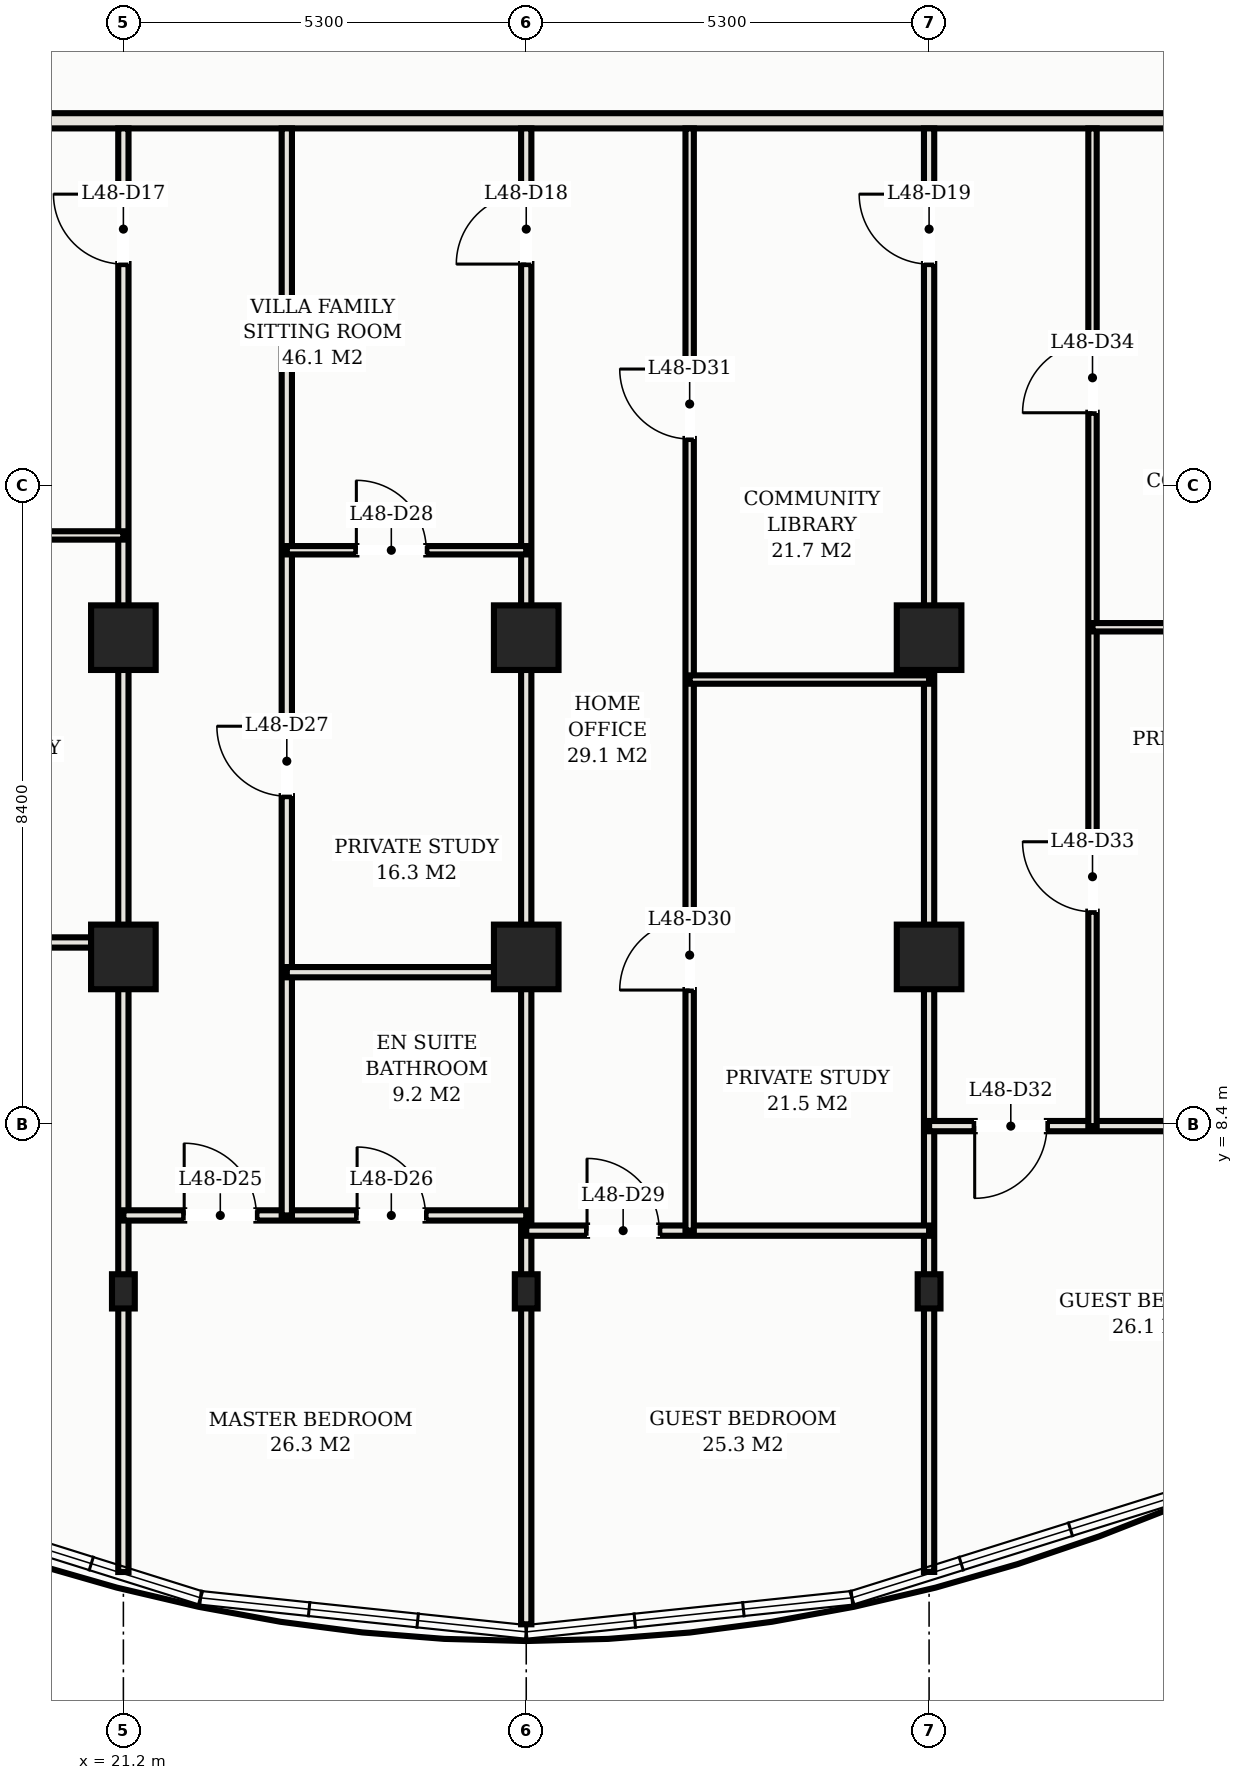
"""IFC4 building model, lengths in metres.
Left out: names, types, materials, properties, quantities, classifications, styles, units other than length and angle.
Written with IfcOpenShell. Run it as: python <this file> out.ifc"""

import sys

from ifc_helpers import new_model, si_unit, direction, frame, frame_2d, origin, origin_2d, place, context, subcontext, project, spatial, rectangle, hollow_rectangle, extrude, element, fill, save


model = new_model("IFC4")
c1 = context("Model", 3, precision=1e-05, world=origin(), true_north=direction((0.0, 1.0)))
c2 = subcontext(c1, "Body", "Model", "MODEL_VIEW")
j1 = project(units=[si_unit("LENGTHUNIT", "METRE"), si_unit("PLANEANGLEUNIT", "RADIAN")], contexts=[c1])
p1 = place(None, origin())
s1 = spatial("IfcSite", under=j1, at=p1, CompositionType="ELEMENT")
p2 = place(p1, origin())
s2 = spatial("IfcBuilding", under=s1, at=p2, CompositionType="ELEMENT")
p3 = place(p2, frame((0.0, 0.0, 175.5)))
s3 = spatial("IfcBuildingStorey", under=s2, at=p3, CompositionType="ELEMENT", Elevation=175.5)
for number, where, z_axis, x_axis in (
    (1, (21.2, 14.8, 0.0), (0.0, 0.0, 1.0), (1.0, 0.0, 0.0)),
    (2, (21.2, 10.6, 0.0), (0.0, 0.0, 1.0), (1.0, 0.0, 0.0)),
    (3, (26.5, 14.8, 0.0), (0.0, 0.0, 1.0), (1.0, 0.0, 0.0)),
    (4, (26.5, 10.6, 0.0), (0.0, 0.0, 1.0), (1.0, 0.0, 0.0)),
    (5, (31.8, 14.8, 0.0), (0.0, 0.0, 1.0), (1.0, 0.0, 0.0)),
    (6, (31.8, 10.6, 0.0), (0.0, 0.0, 1.0), (1.0, 0.0, 0.0)),
):
    element("IfcColumn", number, at=place(p3, frame(where, z_axis=z_axis, x_axis=x_axis)), inside=s3, PredefinedType="COLUMN", context=c2, shape_type="SweptSolid", body=[
        extrude(hollow_rectangle(XDim=0.85, YDim=0.85, WallThickness=0.028, at=origin_2d()), origin(), (0.0, 0.0, 1.0), 3.3),
    ])
for number, where, z_axis, x_axis in (
    (7, (21.2, 6.2, 0.0), (0.0, 0.0, 1.0), (1.0, 0.0, 0.0)),
    (8, (26.5, 6.2, 0.0), (0.0, 0.0, 1.0), (1.0, 0.0, 0.0)),
    (9, (31.8, 6.2, 0.0), (0.0, 0.0, 1.0), (1.0, 0.0, 0.0)),
):
    element("IfcColumn", number, at=place(p3, frame(where, z_axis=z_axis, x_axis=x_axis)), inside=s3, PredefinedType="COLUMN", context=c2, shape_type="SweptSolid", body=[
        extrude(hollow_rectangle(XDim=0.3, YDim=0.45, WallThickness=0.016, at=origin_2d()), origin(), (0.0, 0.0, 1.0), 3.3),
    ])
p4 = place(p3, frame((4.32, 21.6, 0.0), z_axis=(0.0, 0.0, 1.0), x_axis=(1.0, 0.0, 0.0)))
e10 = element("IfcWall", 10, at=p4, inside=s3, PredefinedType="PARTITIONING", context=c2, shape_type="SweptSolid", body=[
    extrude(rectangle(XDim=44.36, YDim=0.2, at=frame_2d((22.18, 0.0))), origin(), (0.0, 0.0, 1.0), 2.38),
])
p5 = place(p4, frame((7.03, 0.0, 0.0)))
e11 = element("IfcOpeningElement", 11, at=p5, cuts=e10, PredefinedType="OPENING", context=c2, shape_type="SweptSolid", body=[
    extrude(rectangle(XDim=1.1, YDim=2.25, at=frame_2d((0.55, 1.125))), frame((0.0, 0.11, 0.0), z_axis=(0.0, -1.0, 0.0), x_axis=(1.0, 0.0, 0.0)), (0.0, 0.0, 1.0), 0.22),
])
p6 = place(p4, frame((2.635, 0.0, 0.0)))
e12 = element("IfcOpeningElement", 12, at=p6, cuts=e10, PredefinedType="OPENING", context=c2, shape_type="SweptSolid", body=[
    extrude(rectangle(XDim=0.92, YDim=2.15, at=frame_2d((0.46, 1.075))), frame((0.0, 0.11, 0.0), z_axis=(0.0, -1.0, 0.0), x_axis=(1.0, 0.0, 0.0)), (0.0, 0.0, 1.0), 0.22),
])
p7 = place(p4, frame((40.805, 0.0, 0.0)))
e13 = element("IfcOpeningElement", 13, at=p7, cuts=e10, PredefinedType="OPENING", context=c2, shape_type="SweptSolid", body=[
    extrude(rectangle(XDim=0.92, YDim=2.15, at=frame_2d((0.46, 1.075))), frame((0.0, 0.11, 0.0), z_axis=(0.0, -1.0, 0.0), x_axis=(1.0, 0.0, 0.0)), (0.0, 0.0, 1.0), 0.22),
])
p8 = place(p3, frame((21.2, 2.508, 0.0), z_axis=(0.0, 0.0, 1.0), x_axis=(0.0, 1.0, 0.0)))
e14 = element("IfcWall", 14, at=p8, inside=s3, PredefinedType="PARTITIONING", context=c2, shape_type="SweptSolid", body=[
    extrude(rectangle(XDim=18.992, YDim=0.135, at=frame_2d((9.496, 0.0))), origin(), (0.0, 0.0, 1.0), 2.38),
])
p9 = place(p8, frame((17.207, 0.0, 0.0)))
e15 = element("IfcOpeningElement", 15, at=p9, cuts=e14, PredefinedType="OPENING", context=c2, shape_type="SweptSolid", body=[
    extrude(rectangle(XDim=0.92, YDim=2.15, at=frame_2d((0.46, 1.075))), frame((0.0, 0.078, 0.0), z_axis=(0.0, -1.0, 0.0), x_axis=(1.0, 0.0, 0.0)), (0.0, 0.0, 1.0), 0.155),
])
p10 = place(p3, frame((26.5, 1.82, 0.0), z_axis=(0.0, 0.0, 1.0), x_axis=(0.0, 1.0, 0.0)))
e16 = element("IfcWall", 16, at=p10, inside=s3, PredefinedType="PARTITIONING", context=c2, shape_type="SweptSolid", body=[
    extrude(rectangle(XDim=19.68, YDim=0.135, at=frame_2d((9.84, 0.0))), origin(), (0.0, 0.0, 1.0), 2.38),
])
p11 = place(p10, frame((17.895, 0.0, 0.0)))
e17 = element("IfcOpeningElement", 17, at=p11, cuts=e16, PredefinedType="OPENING", context=c2, shape_type="SweptSolid", body=[
    extrude(rectangle(XDim=0.92, YDim=2.15, at=frame_2d((0.46, 1.075))), frame((0.0, 0.078, 0.0), z_axis=(0.0, -1.0, 0.0), x_axis=(1.0, 0.0, 0.0)), (0.0, 0.0, 1.0), 0.155),
])
p12 = place(p3, frame((31.8, 2.509, 0.0), z_axis=(0.0, 0.0, 1.0), x_axis=(0.0, 1.0, 0.0)))
e18 = element("IfcWall", 18, at=p12, inside=s3, PredefinedType="PARTITIONING", context=c2, shape_type="SweptSolid", body=[
    extrude(rectangle(XDim=18.991, YDim=0.135, at=frame_2d((9.496, 0.0))), origin(), (0.0, 0.0, 1.0), 2.38),
])
p13 = place(p12, frame((17.206, 0.0, 0.0)))
e19 = element("IfcOpeningElement", 19, at=p13, cuts=e18, PredefinedType="OPENING", context=c2, shape_type="SweptSolid", body=[
    extrude(rectangle(XDim=0.92, YDim=2.15, at=frame_2d((0.46, 1.075))), frame((0.0, 0.078, 0.0), z_axis=(0.0, -1.0, 0.0), x_axis=(1.0, 0.0, 0.0)), (0.0, 0.0, 1.0), 0.155),
])
p14 = place(p3, frame((10.6, 10.79, 0.0), z_axis=(0.0, 0.0, 1.0), x_axis=(1.0, 0.0, 0.0)))
e20 = element("IfcWall", 20, at=p14, inside=s3, PredefinedType="PARTITIONING", context=c2, shape_type="SweptSolid", body=[
    extrude(rectangle(XDim=10.6, YDim=0.135, at=frame_2d((5.3, 0.0))), origin(), (0.0, 0.0, 1.0), 2.38),
])
p15 = place(p14, frame((0.425, 0.0, 0.0)))
e21 = element("IfcOpeningElement", 21, at=p15, cuts=e20, PredefinedType="OPENING", context=c2, shape_type="SweptSolid", body=[
    extrude(rectangle(XDim=1.5, YDim=2.25, at=frame_2d((0.75, 1.125))), frame((0.0, 0.078, 0.0), z_axis=(0.0, -1.0, 0.0), x_axis=(1.0, 0.0, 0.0)), (0.0, 0.0, 1.0), 0.155),
])
p16 = place(p3, frame((15.9, 16.145, 0.0), z_axis=(0.0, 0.0, 1.0), x_axis=(1.0, 0.0, 0.0)))
e22 = element("IfcWall", 22, at=p16, inside=s3, PredefinedType="MOVABLE", context=c2, shape_type="SweptSolid", body=[
    extrude(rectangle(XDim=5.3, YDim=0.11, at=frame_2d((2.65, 0.0))), origin(), (0.0, 0.0, 1.0), 2.38),
])
p17 = place(p16, frame((1.84, 0.0, 0.0)))
e23 = element("IfcOpeningElement", 23, at=p17, cuts=e22, PredefinedType="OPENING", context=c2, shape_type="SweptSolid", body=[
    extrude(rectangle(XDim=0.92, YDim=2.15, at=frame_2d((0.46, 1.075))), frame((0.0, 0.065, 0.0), z_axis=(0.0, -1.0, 0.0), x_axis=(1.0, 0.0, 0.0)), (0.0, 0.0, 1.0), 0.13),
])
p18 = place(p3, frame((21.2, 7.199, 0.0), z_axis=(0.0, 0.0, 1.0), x_axis=(1.0, 0.0, 0.0)))
e24 = element("IfcWall", 24, at=p18, inside=s3, PredefinedType="PARTITIONING", context=c2, shape_type="SweptSolid", body=[
    extrude(rectangle(XDim=5.3, YDim=0.135, at=frame_2d((2.65, 0.0))), origin(), (0.0, 0.0, 1.0), 2.38),
])
p19 = place(p18, frame((0.8, 0.0, 0.0)))
e25 = element("IfcOpeningElement", 25, at=p19, cuts=e24, PredefinedType="OPENING", context=c2, shape_type="SweptSolid", body=[
    extrude(rectangle(XDim=0.95, YDim=2.15, at=frame_2d((0.475, 1.075))), frame((0.0, 0.078, 0.0), z_axis=(0.0, -1.0, 0.0), x_axis=(1.0, 0.0, 0.0)), (0.0, 0.0, 1.0), 0.155),
])
p20 = place(p18, frame((3.075, 0.0, 0.0)))
e26 = element("IfcOpeningElement", 26, at=p20, cuts=e24, PredefinedType="OPENING", context=c2, shape_type="SweptSolid", body=[
    extrude(rectangle(XDim=0.9, YDim=2.15, at=frame_2d((0.45, 1.075))), frame((0.0, 0.078, 0.0), z_axis=(0.0, -1.0, 0.0), x_axis=(1.0, 0.0, 0.0)), (0.0, 0.0, 1.0), 0.155),
])
p21 = place(p3, frame((23.35, 7.199, 0.0), z_axis=(0.0, 0.0, 1.0), x_axis=(0.0, 1.0, 0.0)))
e27 = element("IfcWall", 27, at=p21, inside=s3, PredefinedType="PARTITIONING", context=c2, shape_type="SweptSolid", body=[
    extrude(rectangle(XDim=14.301, YDim=0.135, at=frame_2d((7.15, 0.0))), origin(), (0.0, 0.0, 1.0), 2.38),
])
p22 = place(p21, frame((5.516, 0.0, 0.0)))
e28 = element("IfcOpeningElement", 28, at=p22, cuts=e27, PredefinedType="OPENING", context=c2, shape_type="SweptSolid", body=[
    extrude(rectangle(XDim=0.92, YDim=2.15, at=frame_2d((0.46, 1.075))), frame((0.0, 0.078, 0.0), z_axis=(0.0, -1.0, 0.0), x_axis=(1.0, 0.0, 0.0)), (0.0, 0.0, 1.0), 0.155),
])
p23 = place(p3, frame((23.35, 10.399, 0.0), z_axis=(0.0, 0.0, 1.0), x_axis=(1.0, 0.0, 0.0)))
e29 = element("IfcWall", 29, at=p23, inside=s3, PredefinedType="PARTITIONING", context=c2, shape_type="SweptSolid", body=[
    extrude(rectangle(XDim=3.15, YDim=0.135, at=frame_2d((1.575, 0.0))), origin(), (0.0, 0.0, 1.0), 2.38),
])
p24 = place(p3, frame((23.35, 15.95, 0.0), z_axis=(0.0, 0.0, 1.0), x_axis=(1.0, 0.0, 0.0)))
e30 = element("IfcWall", 30, at=p24, inside=s3, PredefinedType="MOVABLE", context=c2, shape_type="SweptSolid", body=[
    extrude(rectangle(XDim=3.15, YDim=0.11, at=frame_2d((1.575, 0.0))), origin(), (0.0, 0.0, 1.0), 2.38),
])
p25 = place(p24, frame((0.915, 0.0, 0.0)))
e31 = element("IfcOpeningElement", 31, at=p25, cuts=e30, PredefinedType="OPENING", context=c2, shape_type="SweptSolid", body=[
    extrude(rectangle(XDim=0.92, YDim=2.15, at=frame_2d((0.46, 1.075))), frame((0.0, 0.065, 0.0), z_axis=(0.0, -1.0, 0.0), x_axis=(1.0, 0.0, 0.0)), (0.0, 0.0, 1.0), 0.13),
])
p26 = place(p3, frame((26.5, 6.999, 0.0), z_axis=(0.0, 0.0, 1.0), x_axis=(1.0, 0.0, 0.0)))
e32 = element("IfcWall", 32, at=p26, inside=s3, PredefinedType="PARTITIONING", context=c2, shape_type="SweptSolid", body=[
    extrude(rectangle(XDim=5.3, YDim=0.135, at=frame_2d((2.65, 0.0))), origin(), (0.0, 0.0, 1.0), 2.38),
])
p27 = place(p26, frame((0.8, 0.0, 0.0)))
e33 = element("IfcOpeningElement", 33, at=p27, cuts=e32, PredefinedType="OPENING", context=c2, shape_type="SweptSolid", body=[
    extrude(rectangle(XDim=0.95, YDim=2.15, at=frame_2d((0.475, 1.075))), frame((0.0, 0.078, 0.0), z_axis=(0.0, -1.0, 0.0), x_axis=(1.0, 0.0, 0.0)), (0.0, 0.0, 1.0), 0.155),
])
p28 = place(p3, frame((28.65, 6.999, 0.0), z_axis=(0.0, 0.0, 1.0), x_axis=(0.0, 1.0, 0.0)))
e34 = element("IfcWall", 34, at=p28, inside=s3, PredefinedType="MOVABLE", context=c2, shape_type="SweptSolid", body=[
    extrude(rectangle(XDim=14.501, YDim=0.11, at=frame_2d((7.25, 0.0))), origin(), (0.0, 0.0, 1.0), 2.38),
])
p29 = place(p28, frame((3.165, 0.0, 0.0)))
e35 = element("IfcOpeningElement", 35, at=p29, cuts=e34, PredefinedType="OPENING", context=c2, shape_type="SweptSolid", body=[
    extrude(rectangle(XDim=0.92, YDim=2.15, at=frame_2d((0.46, 1.075))), frame((0.0, 0.065, 0.0), z_axis=(0.0, -1.0, 0.0), x_axis=(1.0, 0.0, 0.0)), (0.0, 0.0, 1.0), 0.13),
])
p30 = place(p28, frame((10.415, 0.0, 0.0)))
e36 = element("IfcOpeningElement", 36, at=p30, cuts=e34, PredefinedType="OPENING", context=c2, shape_type="SweptSolid", body=[
    extrude(rectangle(XDim=0.92, YDim=2.15, at=frame_2d((0.46, 1.075))), frame((0.0, 0.065, 0.0), z_axis=(0.0, -1.0, 0.0), x_axis=(1.0, 0.0, 0.0)), (0.0, 0.0, 1.0), 0.13),
])
p31 = place(p3, frame((28.65, 14.249, 0.0), z_axis=(0.0, 0.0, 1.0), x_axis=(1.0, 0.0, 0.0)))
e37 = element("IfcWall", 37, at=p31, inside=s3, PredefinedType="MOVABLE", context=c2, shape_type="SweptSolid", body=[
    extrude(rectangle(XDim=3.15, YDim=0.11, at=frame_2d((1.575, 0.0))), origin(), (0.0, 0.0, 1.0), 2.38),
])
p32 = place(p3, frame((31.8, 8.374, 0.0), z_axis=(0.0, 0.0, 1.0), x_axis=(1.0, 0.0, 0.0)))
e38 = element("IfcWall", 38, at=p32, inside=s3, PredefinedType="PARTITIONING", context=c2, shape_type="SweptSolid", body=[
    extrude(rectangle(XDim=5.3, YDim=0.135, at=frame_2d((2.65, 0.0))), origin(), (0.0, 0.0, 1.0), 2.38),
])
p33 = place(p32, frame((0.6, 0.0, 0.0)))
e39 = element("IfcOpeningElement", 39, at=p33, cuts=e38, PredefinedType="OPENING", context=c2, shape_type="SweptSolid", body=[
    extrude(rectangle(XDim=0.95, YDim=2.15, at=frame_2d((0.475, 1.075))), frame((0.0, 0.078, 0.0), z_axis=(0.0, -1.0, 0.0), x_axis=(1.0, 0.0, 0.0)), (0.0, 0.0, 1.0), 0.155),
])
p34 = place(p3, frame((33.95, 8.374, 0.0), z_axis=(0.0, 0.0, 1.0), x_axis=(0.0, 1.0, 0.0)))
e40 = element("IfcWall", 40, at=p34, inside=s3, PredefinedType="MOVABLE", context=c2, shape_type="SweptSolid", body=[
    extrude(rectangle(XDim=13.126, YDim=0.11, at=frame_2d((6.563, 0.0))), origin(), (0.0, 0.0, 1.0), 2.38),
])
p35 = place(p34, frame((2.821, 0.0, 0.0)))
e41 = element("IfcOpeningElement", 41, at=p35, cuts=e40, PredefinedType="OPENING", context=c2, shape_type="SweptSolid", body=[
    extrude(rectangle(XDim=0.92, YDim=2.15, at=frame_2d((0.46, 1.075))), frame((0.0, 0.065, 0.0), z_axis=(0.0, -1.0, 0.0), x_axis=(1.0, 0.0, 0.0)), (0.0, 0.0, 1.0), 0.13),
])
p36 = place(p34, frame((9.385, 0.0, 0.0)))
e42 = element("IfcOpeningElement", 42, at=p36, cuts=e40, PredefinedType="OPENING", context=c2, shape_type="SweptSolid", body=[
    extrude(rectangle(XDim=0.92, YDim=2.15, at=frame_2d((0.46, 1.075))), frame((0.0, 0.065, 0.0), z_axis=(0.0, -1.0, 0.0), x_axis=(1.0, 0.0, 0.0)), (0.0, 0.0, 1.0), 0.13),
])
p37 = place(p3, frame((33.95, 14.937, 0.0), z_axis=(0.0, 0.0, 1.0), x_axis=(1.0, 0.0, 0.0)))
e43 = element("IfcWall", 43, at=p37, inside=s3, PredefinedType="MOVABLE", context=c2, shape_type="SweptSolid", body=[
    extrude(rectangle(XDim=3.15, YDim=0.11, at=frame_2d((1.575, 0.0))), origin(), (0.0, 0.0, 1.0), 2.38),
])
p38 = place(p9, origin())
e44 = element("IfcDoor", 44, at=p38, inside=s3, OperationType="SINGLE_SWING_RIGHT", PredefinedType="DOOR", context=c2, shape_type="SweptSolid", body=[
    extrude(rectangle(XDim=0.92, YDim=2.15, at=frame_2d((0.46, 1.075))), frame((0.0, 0.025, 0.0), z_axis=(0.0, -1.0, 0.0), x_axis=(1.0, 0.0, 0.0)), (0.0, 0.0, 1.0), 0.05),
])
fill(e15, e44)
p39 = place(p11, origin())
e45 = element("IfcDoor", 45, at=p39, inside=s3, OperationType="SINGLE_SWING_LEFT", PredefinedType="DOOR", context=c2, shape_type="SweptSolid", body=[
    extrude(rectangle(XDim=0.92, YDim=2.15, at=frame_2d((0.46, 1.075))), frame((0.0, 0.025, 0.0), z_axis=(0.0, -1.0, 0.0), x_axis=(1.0, 0.0, 0.0)), (0.0, 0.0, 1.0), 0.05),
])
fill(e17, e45)
p40 = place(p13, origin())
e46 = element("IfcDoor", 46, at=p40, inside=s3, OperationType="SINGLE_SWING_RIGHT", PredefinedType="DOOR", context=c2, shape_type="SweptSolid", body=[
    extrude(rectangle(XDim=0.92, YDim=2.15, at=frame_2d((0.46, 1.075))), frame((0.0, 0.025, 0.0), z_axis=(0.0, -1.0, 0.0), x_axis=(1.0, 0.0, 0.0)), (0.0, 0.0, 1.0), 0.05),
])
fill(e19, e46)
p41 = place(p19, origin())
e47 = element("IfcDoor", 47, at=p41, inside=s3, OperationType="SINGLE_SWING_LEFT", PredefinedType="DOOR", context=c2, shape_type="SweptSolid", body=[
    extrude(rectangle(XDim=0.95, YDim=2.15, at=frame_2d((0.475, 1.075))), frame((0.0, 0.025, 0.0), z_axis=(0.0, -1.0, 0.0), x_axis=(1.0, 0.0, 0.0)), (0.0, 0.0, 1.0), 0.05),
])
fill(e25, e47)
p42 = place(p20, origin())
e48 = element("IfcDoor", 48, at=p42, inside=s3, OperationType="SINGLE_SWING_LEFT", PredefinedType="DOOR", context=c2, shape_type="SweptSolid", body=[
    extrude(rectangle(XDim=0.9, YDim=2.15, at=frame_2d((0.45, 1.075))), frame((0.0, 0.025, 0.0), z_axis=(0.0, -1.0, 0.0), x_axis=(1.0, 0.0, 0.0)), (0.0, 0.0, 1.0), 0.05),
])
fill(e26, e48)
p43 = place(p22, origin())
e49 = element("IfcDoor", 49, at=p43, inside=s3, OperationType="SINGLE_SWING_RIGHT", PredefinedType="DOOR", context=c2, shape_type="SweptSolid", body=[
    extrude(rectangle(XDim=0.92, YDim=2.15, at=frame_2d((0.46, 1.075))), frame((0.0, 0.025, 0.0), z_axis=(0.0, -1.0, 0.0), x_axis=(1.0, 0.0, 0.0)), (0.0, 0.0, 1.0), 0.05),
])
fill(e28, e49)
p44 = place(p25, origin())
e50 = element("IfcDoor", 50, at=p44, inside=s3, OperationType="SINGLE_SWING_LEFT", PredefinedType="DOOR", context=c2, shape_type="SweptSolid", body=[
    extrude(rectangle(XDim=0.92, YDim=2.15, at=frame_2d((0.46, 1.075))), frame((0.0, 0.025, 0.0), z_axis=(0.0, -1.0, 0.0), x_axis=(1.0, 0.0, 0.0)), (0.0, 0.0, 1.0), 0.05),
])
fill(e31, e50)
p45 = place(p27, origin())
e51 = element("IfcDoor", 51, at=p45, inside=s3, OperationType="SINGLE_SWING_LEFT", PredefinedType="DOOR", context=c2, shape_type="SweptSolid", body=[
    extrude(rectangle(XDim=0.95, YDim=2.15, at=frame_2d((0.475, 1.075))), frame((0.0, 0.025, 0.0), z_axis=(0.0, -1.0, 0.0), x_axis=(1.0, 0.0, 0.0)), (0.0, 0.0, 1.0), 0.05),
])
fill(e33, e51)
p46 = place(p29, origin())
e52 = element("IfcDoor", 52, at=p46, inside=s3, OperationType="SINGLE_SWING_LEFT", PredefinedType="DOOR", context=c2, shape_type="SweptSolid", body=[
    extrude(rectangle(XDim=0.92, YDim=2.15, at=frame_2d((0.46, 1.075))), frame((0.0, 0.025, 0.0), z_axis=(0.0, -1.0, 0.0), x_axis=(1.0, 0.0, 0.0)), (0.0, 0.0, 1.0), 0.05),
])
fill(e35, e52)
p47 = place(p30, origin())
e53 = element("IfcDoor", 53, at=p47, inside=s3, OperationType="SINGLE_SWING_RIGHT", PredefinedType="DOOR", context=c2, shape_type="SweptSolid", body=[
    extrude(rectangle(XDim=0.92, YDim=2.15, at=frame_2d((0.46, 1.075))), frame((0.0, 0.025, 0.0), z_axis=(0.0, -1.0, 0.0), x_axis=(1.0, 0.0, 0.0)), (0.0, 0.0, 1.0), 0.05),
])
fill(e36, e53)
p48 = place(p33, frame((0.95, 0.0, 0.0), z_axis=(0.0, 0.0, 1.0), x_axis=(-1.0, 0.0, 0.0)))
e54 = element("IfcDoor", 54, at=p48, inside=s3, OperationType="SINGLE_SWING_RIGHT", PredefinedType="DOOR", context=c2, shape_type="SweptSolid", body=[
    extrude(rectangle(XDim=0.95, YDim=2.15, at=frame_2d((0.475, 1.075))), frame((0.0, 0.025, 0.0), z_axis=(0.0, -1.0, 0.0), x_axis=(1.0, 0.0, 0.0)), (0.0, 0.0, 1.0), 0.05),
])
fill(e39, e54)
p49 = place(p35, origin())
e55 = element("IfcDoor", 55, at=p49, inside=s3, OperationType="SINGLE_SWING_RIGHT", PredefinedType="DOOR", context=c2, shape_type="SweptSolid", body=[
    extrude(rectangle(XDim=0.92, YDim=2.15, at=frame_2d((0.46, 1.075))), frame((0.0, 0.025, 0.0), z_axis=(0.0, -1.0, 0.0), x_axis=(1.0, 0.0, 0.0)), (0.0, 0.0, 1.0), 0.05),
])
fill(e41, e55)
p50 = place(p36, origin())
e56 = element("IfcDoor", 56, at=p50, inside=s3, OperationType="SINGLE_SWING_LEFT", PredefinedType="DOOR", context=c2, shape_type="SweptSolid", body=[
    extrude(rectangle(XDim=0.92, YDim=2.15, at=frame_2d((0.46, 1.075))), frame((0.0, 0.025, 0.0), z_axis=(0.0, -1.0, 0.0), x_axis=(1.0, 0.0, 0.0)), (0.0, 0.0, 1.0), 0.05),
])
fill(e42, e56)
save(model, sys.argv[1])
